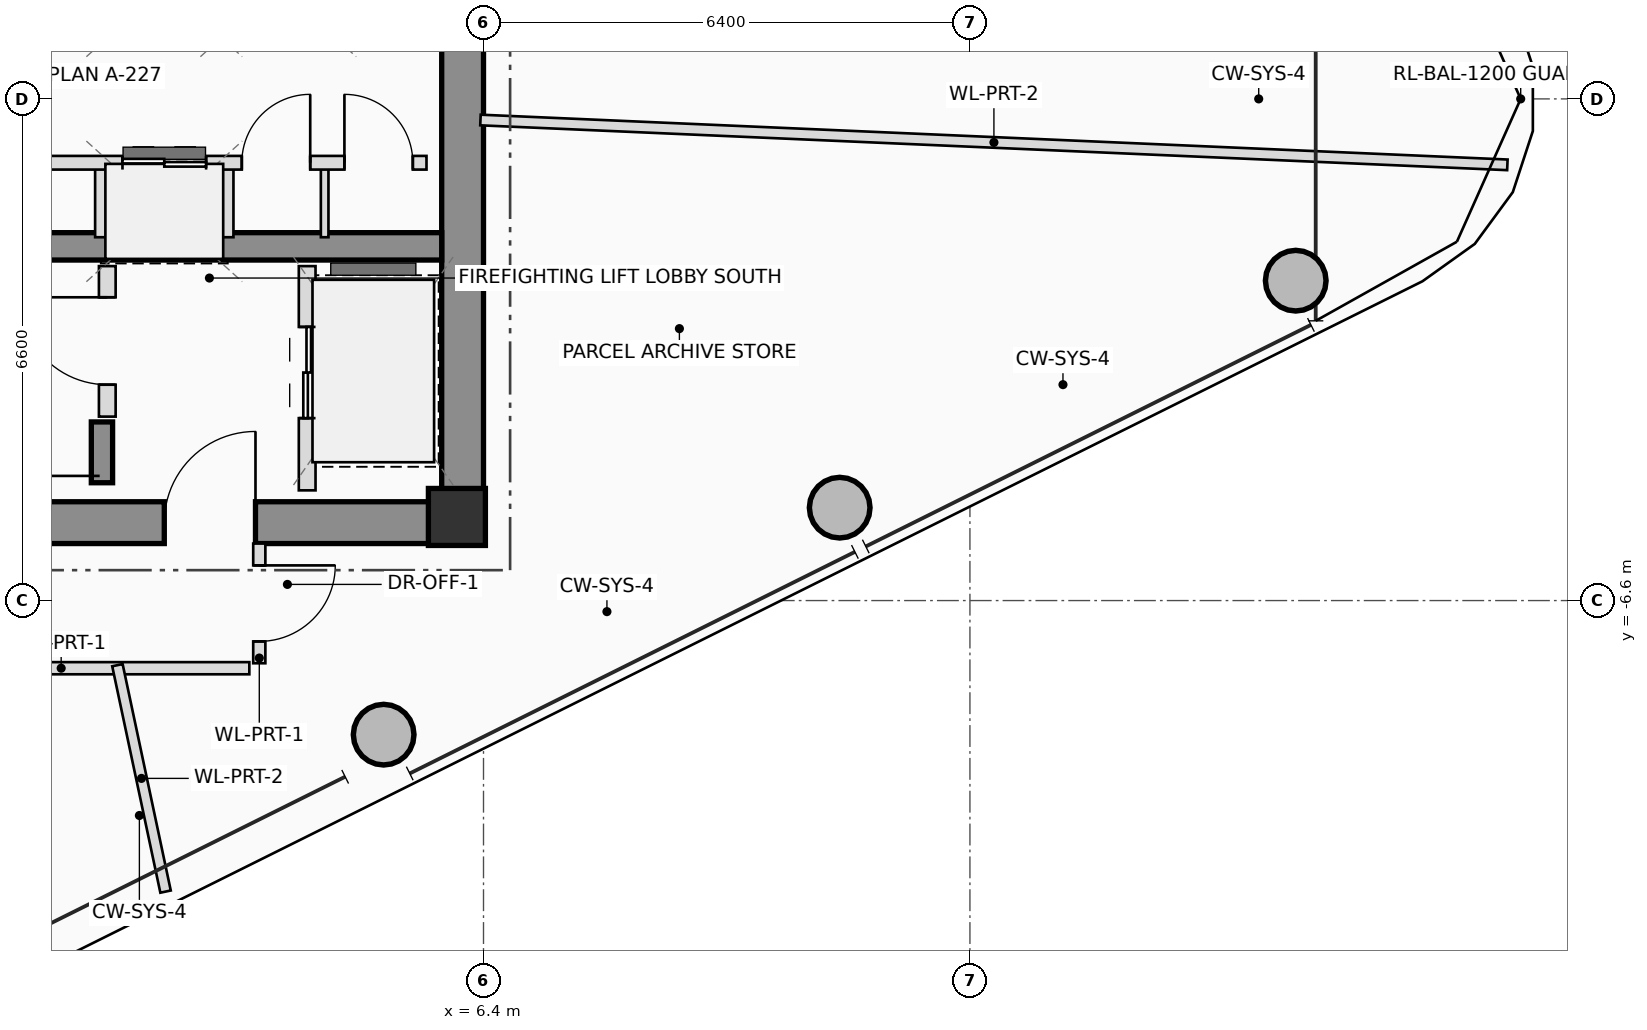
"""IFC4 building model, lengths in metres.
Left out: names, types, materials, properties, quantities, classifications, styles, units other than length and angle.
Written with IfcOpenShell. Run it as: python <this file> out.ifc"""

import sys

from ifc_helpers import new_model, si_unit, direction, frame, frame_2d, origin, origin_2d, place, context, subcontext, project, spatial, rectangle, hollow_circle, extrude, source, transform, mapped, element, fill, save


model = new_model("IFC4")
c1 = context("Model", 3, precision=1e-05, world=origin(), true_north=direction((0.0, 1.0)))
c2 = subcontext(c1, "Body", "Model", "MODEL_VIEW")
j1 = project(units=[si_unit("LENGTHUNIT", "METRE"), si_unit("PLANEANGLEUNIT", "RADIAN")], contexts=[c1])
p1 = place(None, origin())
s1 = spatial("IfcSite", under=j1, at=p1, CompositionType="ELEMENT")
p2 = place(p1, origin())
s2 = spatial("IfcBuilding", under=s1, at=p2, CompositionType="ELEMENT")
p3 = place(p2, frame((0.0, 0.0, 293.3)))
s3 = spatial("IfcBuildingStorey", under=s2, at=p3, CompositionType="ELEMENT", Elevation=293.3)
m1 = source(origin(), c2, "Body", "SweptSolid", [
    extrude(rectangle(XDim=0.75, YDim=0.75, at=origin_2d()), origin(), (0.0, 0.0, 1.0), 3.45),
])
p4 = place(p3, frame((6.05, -5.5, 0.0), z_axis=(0.0, 0.0, 1.0), x_axis=(1.0, 0.0, 0.0)))
e1 = element("IfcColumn", 1, at=p4, inside=s3, PredefinedType="COLUMN", context=c2, shape_type="MappedRepresentation", body=[
    mapped(m1, transform((0.0, 0.0, 0.0), scale=1.0)),
])
p5 = place(p3, frame((-6.4, -5.575, 0.0), z_axis=(0.0, 0.0, 1.0), x_axis=(1.0, 0.0, 0.0)))
e2 = element("IfcWall", 2, at=p5, inside=s3, PredefinedType="SHEAR", context=c2, shape_type="SweptSolid", body=[
    extrude(rectangle(XDim=12.8, YDim=0.55, at=frame_2d((6.4, 0.0))), origin(), (0.0, 0.0, 1.0), 3.45),
])
p6 = place(p5, frame((8.6, 0.0, 0.0)))
e3 = element("IfcOpeningElement", 3, at=p6, cuts=e2, PredefinedType="OPENING", context=c2, shape_type="SweptSolid", body=[
    extrude(rectangle(XDim=1.2, YDim=2.2, at=frame_2d((0.6, 1.1))), frame((0.0, 0.285, 0.0), z_axis=(0.0, -1.0, 0.0), x_axis=(1.0, 0.0, 0.0)), (0.0, 0.0, 1.0), 0.57),
])
p7 = place(p3, frame((6.125, -5.3, 0.0), z_axis=(0.0, 0.0, 1.0), x_axis=(0.0, 1.0, 0.0)))
e4 = element("IfcWall", 4, at=p7, inside=s3, PredefinedType="SHEAR", context=c2, shape_type="SweptSolid", body=[
    extrude(rectangle(XDim=10.6, YDim=0.55, at=frame_2d((5.3, 0.0))), origin(), (0.0, 0.0, 1.0), 3.45),
])
p8 = place(p3, frame((-5.85, -1.94, 0.0), z_axis=(0.0, 0.0, 1.0), x_axis=(1.0, 0.0, 0.0)))
e5 = element("IfcWall", 5, at=p8, inside=s3, PredefinedType="SHEAR", context=c2, shape_type="SweptSolid", body=[
    extrude(rectangle(XDim=11.7, YDim=0.36, at=frame_2d((5.85, 0.0))), origin(), (0.0, 0.0, 1.0), 3.45),
])
p9 = place(p3, frame((1.38, -5.05, 0.0), z_axis=(0.0, 0.0, 1.0), x_axis=(0.0, 1.0, 0.0)))
e6 = element("IfcWall", 6, at=p9, inside=s3, PredefinedType="SHEAR", context=c2, shape_type="SweptSolid", body=[
    extrude(rectangle(XDim=0.8, YDim=0.28, at=frame_2d((0.4, 0.0))), origin(), (0.0, 0.0, 1.0), 3.45),
])
m2 = source(origin(), c2, "Body", "SweptSolid", [
    extrude(hollow_circle(Radius=0.4, WallThickness=0.028, at=origin_2d()), origin(), (0.0, 0.0, 1.0), 3.45),
])
for number, where, z_axis, x_axis in (
    (7, (5.086, -8.364, 0.0), (0.0, 0.0, 1.0), (1.0, 0.0, 0.0)),
    (8, (11.086, -5.378, 0.0), (0.0, 0.0, 1.0), (1.0, 0.0, 0.0)),
    (9, (17.087, -2.392, 0.0), (0.0, 0.0, 1.0), (1.0, 0.0, 0.0)),
):
    element("IfcColumn", number, at=place(p3, frame(where, z_axis=z_axis, x_axis=x_axis)), inside=s3, PredefinedType="COLUMN", context=c2, shape_type="MappedRepresentation", body=[
        mapped(m2, transform((0.0, 0.0, 0.0), scale=1.0)),
    ])
p10 = place(p3, frame((1.45, -4.18, 0.0), z_axis=(0.0, 0.0, 1.0), x_axis=(0.0, 1.0, 0.0)))
e10 = element("IfcWall", 10, at=p10, inside=s3, PredefinedType="PLUMBINGWALL", context=c2, shape_type="SweptSolid", body=[
    extrude(rectangle(XDim=1.98, YDim=0.22, at=frame_2d((0.99, 0.0))), origin(), (0.0, 0.0, 1.0), 3.25),
])
p11 = place(p10, frame((0.42, 0.0, 0.0)))
e11 = element("IfcOpeningElement", 11, at=p11, cuts=e10, PredefinedType="OPENING", context=c2, shape_type="SweptSolid", body=[
    extrude(rectangle(XDim=1.15, YDim=2.15, at=frame_2d((0.575, 1.075))), frame((0.0, 0.12, 0.0), z_axis=(0.0, -1.0, 0.0), x_axis=(1.0, 0.0, 0.0)), (0.0, 0.0, 1.0), 0.24),
])
p12 = place(p3, frame((4.08, -5.15, 0.0), z_axis=(0.0, 0.0, 1.0), x_axis=(0.0, 1.0, 0.0)))
e12 = element("IfcWall", 12, at=p12, inside=s3, PredefinedType="PLUMBINGWALL", context=c2, shape_type="SweptSolid", body=[
    extrude(rectangle(XDim=2.95, YDim=0.22, at=frame_2d((1.475, 0.0))), origin(), (0.0, 0.0, 1.0), 3.25),
])
p13 = place(p12, frame((0.95, 0.0, 0.0)))
e13 = element("IfcOpeningElement", 13, at=p13, cuts=e12, PredefinedType="OPENING", context=c2, shape_type="SweptSolid", body=[
    extrude(rectangle(XDim=1.2, YDim=2.25, at=frame_2d((0.6, 1.125))), frame((0.0, 0.12, 0.0), z_axis=(0.0, -1.0, 0.0), x_axis=(1.0, 0.0, 0.0)), (0.0, 0.0, 1.0), 0.24),
])
for number, where, z_axis, x_axis in (
    (14, (1.38, -1.82, 0.0), (0.0, 0.0, 1.0), (0.0, 1.0, 0.0)),
    (15, (3.02, -1.82, 0.0), (0.0, 0.0, 1.0), (0.0, 1.0, 0.0)),
):
    element("IfcWall", number, at=place(p3, frame(where, z_axis=z_axis, x_axis=x_axis)), inside=s3, PredefinedType="PLUMBINGWALL", context=c2, shape_type="SweptSolid", body=[
        extrude(rectangle(XDim=0.98, YDim=0.18, at=frame_2d((0.49, 0.0))), origin(), (0.0, 0.0, 1.0), 3.25),
    ])
p14 = place(p3, frame((4.31, -1.82, 0.0), z_axis=(0.0, 0.0, 1.0), x_axis=(0.0, 1.0, 0.0)))
e16 = element("IfcWall", 16, at=p14, inside=s3, PredefinedType="PARTITIONING", context=c2, shape_type="SweptSolid", body=[
    extrude(rectangle(XDim=0.98, YDim=0.1, at=frame_2d((0.49, 0.0))), origin(), (0.0, 0.0, 1.0), 3.25),
])
p15 = place(p3, frame((-5.68, -0.84, 0.0), z_axis=(0.0, 0.0, 1.0), x_axis=(1.0, 0.0, 0.0)))
e17 = element("IfcWall", 17, at=p15, inside=s3, PredefinedType="PLUMBINGWALL", context=c2, shape_type="SweptSolid", body=[
    extrude(rectangle(XDim=11.33, YDim=0.18, at=frame_2d((5.665, 0.0))), origin(), (0.0, 0.0, 1.0), 3.25),
])
p16 = place(p15, frame((1.88, 0.0, 0.0)))
e18 = element("IfcOpeningElement", 18, at=p16, cuts=e17, PredefinedType="OPENING", context=c2, shape_type="SweptSolid", body=[
    extrude(rectangle(XDim=0.9, YDim=2.05, at=frame_2d((0.45, 1.025))), frame((0.0, 0.1, 0.0), z_axis=(0.0, -1.0, 0.0), x_axis=(1.0, 0.0, 0.0)), (0.0, 0.0, 1.0), 0.2),
])
p17 = place(p15, frame((5.35, 0.0, 0.0)))
e19 = element("IfcOpeningElement", 19, at=p17, cuts=e17, PredefinedType="OPENING", context=c2, shape_type="SweptSolid", body=[
    extrude(rectangle(XDim=0.9, YDim=2.05, at=frame_2d((0.45, 1.025))), frame((0.0, 0.1, 0.0), z_axis=(0.0, -1.0, 0.0), x_axis=(1.0, 0.0, 0.0)), (0.0, 0.0, 1.0), 0.2),
])
p18 = place(p15, frame((7.33, 0.0, 0.0)))
e20 = element("IfcOpeningElement", 20, at=p18, cuts=e17, PredefinedType="OPENING", context=c2, shape_type="SweptSolid", body=[
    extrude(rectangle(XDim=1.1, YDim=2.2, at=frame_2d((0.55, 1.1))), frame((0.0, 0.1, 0.0), z_axis=(0.0, -1.0, 0.0), x_axis=(1.0, 0.0, 0.0)), (0.0, 0.0, 1.0), 0.2),
])
p19 = place(p15, frame((8.9, 0.0, 0.0)))
e21 = element("IfcOpeningElement", 21, at=p19, cuts=e17, PredefinedType="OPENING", context=c2, shape_type="SweptSolid", body=[
    extrude(rectangle(XDim=0.9, YDim=2.05, at=frame_2d((0.45, 1.025))), frame((0.0, 0.1, 0.0), z_axis=(0.0, -1.0, 0.0), x_axis=(1.0, 0.0, 0.0)), (0.0, 0.0, 1.0), 0.2),
])
p20 = place(p15, frame((10.25, 0.0, 0.0)))
e22 = element("IfcOpeningElement", 22, at=p20, cuts=e17, PredefinedType="OPENING", context=c2, shape_type="SweptSolid", body=[
    extrude(rectangle(XDim=0.9, YDim=2.05, at=frame_2d((0.45, 1.025))), frame((0.0, 0.1, 0.0), z_axis=(0.0, -1.0, 0.0), x_axis=(1.0, 0.0, 0.0)), (0.0, 0.0, 1.0), 0.2),
])
p21 = place(p3, frame((3.45, -5.85, 0.0), z_axis=(0.0, 0.0, 1.0), x_axis=(0.0, -1.0, 0.0)))
e23 = element("IfcWall", 23, at=p21, inside=s3, PredefinedType="PARTITIONING", context=c2, shape_type="SweptSolid", body=[
    extrude(rectangle(XDim=1.575, YDim=0.16, at=frame_2d((0.787, 0.0))), origin(), (0.0, 0.0, 1.0), 2.855),
])
p22 = place(p21, frame((0.287, 0.0, 0.0)))
e24 = element("IfcOpeningElement", 24, at=p22, cuts=e23, PredefinedType="OPENING", context=c2, shape_type="SweptSolid", body=[
    extrude(rectangle(XDim=1.0, YDim=2.25, at=frame_2d((0.5, 1.125))), frame((0.0, 0.09, 0.0), z_axis=(0.0, -1.0, 0.0), x_axis=(1.0, 0.0, 0.0)), (0.0, 0.0, 1.0), 0.18),
])
p23 = place(p3, frame((3.319, -7.49, 0.0), z_axis=(0.0, 0.0, 1.0), x_axis=(-1.0, 0.0, 0.0)))
e25 = element("IfcWall", 25, at=p23, inside=s3, PredefinedType="PARTITIONING", context=c2, shape_type="SweptSolid", body=[
    extrude(rectangle(XDim=9.679, YDim=0.16, at=frame_2d((4.84, 0.0))), origin(), (0.0, 0.0, 1.0), 2.655),
])
p24 = place(p23, frame((5.101, 0.0, 0.0)))
e26 = element("IfcOpeningElement", 26, at=p24, cuts=e25, PredefinedType="OPENING", context=c2, shape_type="SweptSolid", body=[
    extrude(rectangle(XDim=1.0, YDim=2.25, at=frame_2d((0.5, 1.125))), frame((0.0, 0.09, 0.0), z_axis=(0.0, -1.0, 0.0), x_axis=(1.0, 0.0, 0.0)), (0.0, 0.0, 1.0), 0.18),
])
p25 = place(p3, frame((6.36, -0.278, 0.0), z_axis=(0.0, 0.0, 1.0), x_axis=(0.999047623791, -0.043633076864, 0.0)))
e27 = element("IfcWall", 27, at=p25, inside=s3, PredefinedType="PARTITIONING", context=c2, shape_type="SweptSolid", body=[
    extrude(rectangle(XDim=13.524, YDim=0.14, at=frame_2d((6.762, 0.0))), origin(), (0.0, 0.0, 1.0), 2.815),
])
p26 = place(p3, frame((1.583, -7.45, 0.0), z_axis=(0.0, 0.0, 1.0), x_axis=(0.207941206443, -0.978141326529, 0.0)))
e28 = element("IfcWall", 28, at=p26, inside=s3, PredefinedType="PARTITIONING", context=c2, shape_type="SweptSolid", body=[
    extrude(rectangle(XDim=3.046, YDim=0.14, at=frame_2d((1.523, 0.0))), origin(), (0.0, 0.0, 1.0), 2.815),
])
p27 = place(p6, origin())
e29 = element("IfcDoor", 29, at=p27, inside=s3, OperationType="SINGLE_SWING_RIGHT", PredefinedType="DOOR", context=c2, shape_type="SweptSolid", body=[
    extrude(rectangle(XDim=1.2, YDim=2.2, at=frame_2d((0.6, 1.1))), frame((0.0, 0.025, 0.0), z_axis=(0.0, -1.0, 0.0), x_axis=(1.0, 0.0, 0.0)), (0.0, 0.0, 1.0), 0.05),
])
fill(e3, e29)
p28 = place(p11, origin())
e30 = element("IfcDoor", 30, at=p28, inside=s3, OperationType="SINGLE_SWING_RIGHT", PredefinedType="DOOR", context=c2, shape_type="SweptSolid", body=[
    extrude(rectangle(XDim=1.15, YDim=2.15, at=frame_2d((0.575, 1.075))), frame((0.0, 0.025, 0.0), z_axis=(0.0, -1.0, 0.0), x_axis=(1.0, 0.0, 0.0)), (0.0, 0.0, 1.0), 0.05),
])
fill(e11, e30)
p29 = place(p13, origin())
e31 = element("IfcDoor", 31, at=p29, inside=s3, OperationType="DOUBLE_DOOR_SLIDING", PredefinedType="DOOR", context=c2, shape_type="SweptSolid", body=[
    extrude(rectangle(XDim=1.2, YDim=2.25, at=frame_2d((0.6, 1.125))), frame((0.0, 0.025, 0.0), z_axis=(0.0, -1.0, 0.0), x_axis=(1.0, 0.0, 0.0)), (0.0, 0.0, 1.0), 0.05),
])
fill(e13, e31)
p30 = place(p18, origin())
e32 = element("IfcDoor", 32, at=p30, inside=s3, OperationType="DOUBLE_DOOR_SLIDING", PredefinedType="DOOR", context=c2, shape_type="SweptSolid", body=[
    extrude(rectangle(XDim=1.1, YDim=2.2, at=frame_2d((0.55, 1.1))), frame((0.0, 0.025, 0.0), z_axis=(0.0, -1.0, 0.0), x_axis=(1.0, 0.0, 0.0)), (0.0, 0.0, 1.0), 0.05),
])
fill(e20, e32)
p31 = place(p19, origin())
e33 = element("IfcDoor", 33, at=p31, inside=s3, OperationType="SINGLE_SWING_RIGHT", PredefinedType="DOOR", context=c2, shape_type="SweptSolid", body=[
    extrude(rectangle(XDim=0.9, YDim=2.05, at=frame_2d((0.45, 1.025))), frame((0.0, 0.025, 0.0), z_axis=(0.0, -1.0, 0.0), x_axis=(1.0, 0.0, 0.0)), (0.0, 0.0, 1.0), 0.05),
])
fill(e21, e33)
p32 = place(p20, origin())
e34 = element("IfcDoor", 34, at=p32, inside=s3, OperationType="SINGLE_SWING_LEFT", PredefinedType="DOOR", context=c2, shape_type="SweptSolid", body=[
    extrude(rectangle(XDim=0.9, YDim=2.05, at=frame_2d((0.45, 1.025))), frame((0.0, 0.025, 0.0), z_axis=(0.0, -1.0, 0.0), x_axis=(1.0, 0.0, 0.0)), (0.0, 0.0, 1.0), 0.05),
])
fill(e22, e34)
p33 = place(p22, origin())
e35 = element("IfcDoor", 35, at=p33, inside=s3, OperationType="SINGLE_SWING_LEFT", PredefinedType="DOOR", context=c2, shape_type="SweptSolid", body=[
    extrude(rectangle(XDim=1.0, YDim=2.25, at=frame_2d((0.5, 1.125))), frame((0.0, 0.025, 0.0), z_axis=(0.0, -1.0, 0.0), x_axis=(1.0, 0.0, 0.0)), (0.0, 0.0, 1.0), 0.05),
])
fill(e24, e35)
save(model, sys.argv[1])
